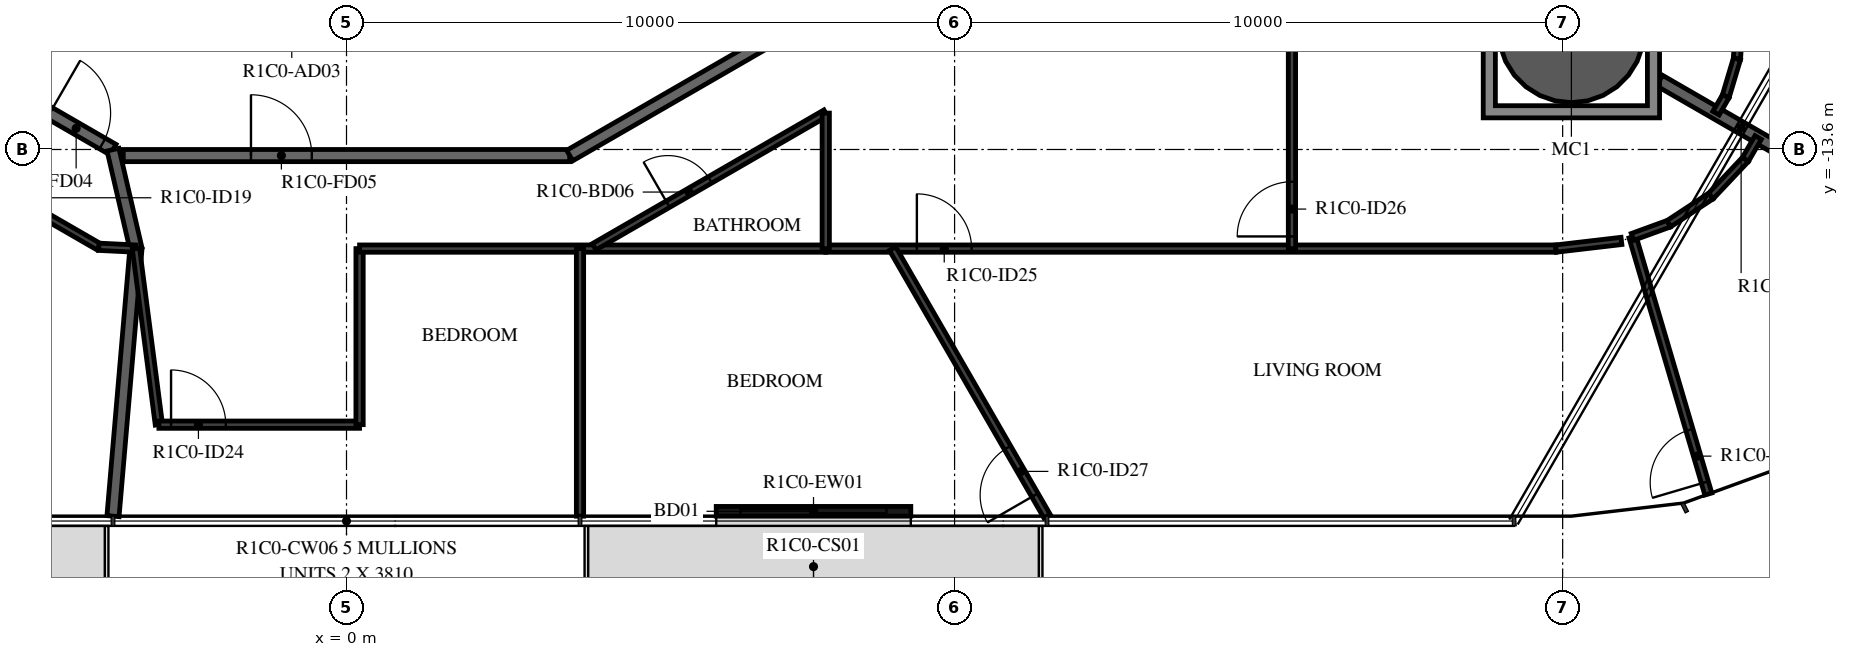
"""IFC4 building model, lengths in metres.
Left out: names, types, materials, properties, quantities, classifications, styles, units other than length and angle.
Written with IfcOpenShell. Run it as: python <this file> out.ifc"""

import sys

from ifc_helpers import new_model, si_unit, direction, frame, frame_2d, origin, origin_2d, place, context, subcontext, project, spatial, polyline, rectangle, hollow_circle, outline, extrude, element, fill, save


model = new_model("IFC4")
c1 = context("Model", 3, precision=1e-05, world=origin(), true_north=direction((0.0, 1.0)))
c2 = subcontext(c1, "Body", "Model", "MODEL_VIEW")
j1 = project(units=[si_unit("LENGTHUNIT", "METRE"), si_unit("PLANEANGLEUNIT", "RADIAN")], contexts=[c1])
p1 = place(None, origin())
s1 = spatial("IfcSite", under=j1, at=p1, CompositionType="ELEMENT")
p2 = place(p1, origin())
s2 = spatial("IfcBuilding", under=s1, at=p2, CompositionType="ELEMENT")
p3 = place(p2, frame((0.0, 0.0, 66.4)))
s3 = spatial("IfcBuildingStorey", under=s2, at=p3, CompositionType="ELEMENT", Elevation=66.4)
p4 = place(p3, frame((20.144, -11.63, -0.38), z_axis=(0.0, 0.0, 1.0), x_axis=(1.0, 0.0, 0.0)))
e1 = element("IfcColumn", 1, at=p4, inside=s3, PredefinedType="COLUMN", context=c2, shape_type="SweptSolid", body=[
    extrude(hollow_circle(Radius=1.2, WallThickness=0.06, at=origin_2d()), origin(), (0.0, 0.0, 1.0), 2.616),
])
p5 = place(p3, frame((6.08, -19.55, 0.0), z_axis=(0.0, 0.0, 1.0), x_axis=(1.0, 0.0, 0.0)))
e2 = element("IfcWall", 2, at=p5, inside=s3, PredefinedType="STANDARD", context=c2, shape_type="SweptSolid", body=[
    extrude(rectangle(XDim=3.2, YDim=0.16, at=frame_2d((1.6, 0.0))), origin(), (0.0, 0.0, 1.0), 3.05),
])
p6 = place(p5, frame((0.4, 0.0, 0.0)))
e3 = element("IfcOpeningElement", 3, at=p6, cuts=e2, PredefinedType="OPENING", context=c2, shape_type="SweptSolid", body=[
    extrude(rectangle(XDim=2.4, YDim=2.4, at=frame_2d((1.2, 1.2))), frame((0.0, 0.09, 0.0), z_axis=(0.0, -1.0, 0.0), x_axis=(1.0, 0.0, 0.0)), (0.0, 0.0, 1.0), 0.18),
])
p7 = place(p3, frame((-10.029, -10.029, 0.0), z_axis=(0.0, 0.0, 1.0), x_axis=(0.866022878987, -0.500004373052, 0.0)))
e4 = element("IfcWall", 4, at=p7, inside=s3, PredefinedType="STANDARD", context=c2, shape_type="SweptSolid", body=[
    extrude(rectangle(XDim=7.146, YDim=0.2, at=frame_2d((3.573, 0.0))), origin(), (0.0, 0.0, 1.0), 3.05),
])
p8 = place(p7, frame((5.947, 0.0, 0.0)))
e5 = element("IfcOpeningElement", 5, at=p8, cuts=e4, PredefinedType="OPENING", context=c2, shape_type="SweptSolid", body=[
    extrude(rectangle(XDim=1.0, YDim=2.1, at=frame_2d((0.5, 1.05))), frame((0.0, 0.11, 0.0), z_axis=(0.0, -1.0, 0.0), x_axis=(1.0, 0.0, 0.0)), (0.0, 0.0, 1.0), 0.22),
])
p9 = place(p3, frame((-3.671, -13.7, 0.0), z_axis=(0.0, 0.0, 1.0), x_axis=(1.0, 0.0, 0.0)))
e6 = element("IfcWall", 6, at=p9, inside=s3, PredefinedType="STANDARD", context=c2, shape_type="SweptSolid", body=[
    extrude(rectangle(XDim=7.342, YDim=0.2, at=frame_2d((3.671, 0.0))), origin(), (0.0, 0.0, 1.0), 3.05),
])
p10 = place(p9, frame((2.1, 0.0, 0.0)))
e7 = element("IfcOpeningElement", 7, at=p10, cuts=e6, PredefinedType="OPENING", context=c2, shape_type="SweptSolid", body=[
    extrude(rectangle(XDim=1.0, YDim=2.1, at=frame_2d((0.5, 1.05))), frame((0.0, 0.11, 0.0), z_axis=(0.0, -1.0, 0.0), x_axis=(1.0, 0.0, 0.0)), (0.0, 0.0, 1.0), 0.22),
])
p11 = place(p3, frame((3.671, -13.7, 0.0), z_axis=(0.0, 0.0, 1.0), x_axis=(0.866024439905, 0.500001669485, 0.0)))
e8 = element("IfcWall", 8, at=p11, inside=s3, PredefinedType="STANDARD", context=c2, shape_type="SweptSolid", body=[
    extrude(rectangle(XDim=7.342, YDim=0.2, at=frame_2d((3.671, 0.0))), origin(), (0.0, 0.0, 1.0), 3.05),
])
p12 = place(p3, frame((-3.463, -15.23, 0.0), z_axis=(0.0, 0.0, 1.0), x_axis=(-0.225894501138, 0.974151771725, 0.0)))
e9 = element("IfcWall", 9, at=p12, inside=s3, PredefinedType="STANDARD", context=c2, shape_type="SweptSolid", body=[
    extrude(rectangle(XDim=1.671, YDim=0.2, at=frame_2d((0.835, 0.0))), origin(), (0.0, 0.0, 1.0), 3.05),
])
p13 = place(p3, frame((-3.84, -19.63, 0.0), z_axis=(0.0, 0.0, 1.0), x_axis=(0.085470135005, 0.996340732893, 0.0)))
e10 = element("IfcWall", 10, at=p13, inside=s3, PredefinedType="STANDARD", context=c2, shape_type="SweptSolid", body=[
    extrude(rectangle(XDim=4.416, YDim=0.2, at=frame_2d((2.208, 0.0))), origin(), (0.0, 0.0, 1.0), 3.05),
])
p14 = place(p3, frame((27.025, -15.603, 0.0), z_axis=(0.0, 0.0, 1.0), x_axis=(-0.866030653443, 0.499990907215, 0.0)))
e11 = element("IfcWall", 11, at=p14, inside=s3, PredefinedType="STANDARD", context=c2, shape_type="SweptSolid", body=[
    extrude(rectangle(XDim=6.271, YDim=0.2, at=frame_2d((3.136, 0.0))), origin(), (0.0, 0.0, 1.0), 3.05),
])
p15 = place(p3, frame((-5.122, -14.594, 0.0), z_axis=(0.0, 0.0, 1.0), x_axis=(0.86610168388, -0.499867855718, 0.0)))
e12 = element("IfcWall", 12, at=p15, inside=s3, PredefinedType="PARTITIONING", context=c2, shape_type="SweptSolid", body=[
    extrude(rectangle(XDim=1.211, YDim=0.12, at=frame_2d((0.605, 0.0))), origin(), (0.0, 0.0, 1.0), 3.05),
])
p16 = place(p3, frame((-4.073, -15.2, 0.0), z_axis=(0.0, 0.0, 1.0), x_axis=(0.99879090756, -0.049160176723, 0.0)))
e13 = element("IfcWall", 13, at=p16, inside=s3, PredefinedType="PARTITIONING", context=c2, shape_type="SweptSolid", body=[
    extrude(rectangle(XDim=0.611, YDim=0.12, at=frame_2d((0.305, 0.0))), origin(), (0.0, 0.0, 1.0), 3.05),
])
p17 = place(p3, frame((-3.463, -15.23, 0.0), z_axis=(0.0, 0.0, 1.0), x_axis=(0.129260547059, -0.991610665016, 0.0)))
e14 = element("IfcWall", 14, at=p17, inside=s3, PredefinedType="PARTITIONING", context=c2, shape_type="SweptSolid", body=[
    extrude(rectangle(XDim=2.92, YDim=0.12, at=frame_2d((1.46, 0.0))), origin(), (0.0, 0.0, 1.0), 3.05),
])
p18 = place(p3, frame((-3.085, -18.125, 0.0), z_axis=(0.0, 0.0, 1.0), x_axis=(1.0, 0.0, 0.0)))
e15 = element("IfcWall", 15, at=p18, inside=s3, PredefinedType="PARTITIONING", context=c2, shape_type="SweptSolid", body=[
    extrude(rectangle(XDim=3.3, YDim=0.12, at=frame_2d((1.65, 0.0))), origin(), (0.0, 0.0, 1.0), 3.05),
])
p19 = place(p18, frame((0.2, 0.0, 0.0)))
e16 = element("IfcOpeningElement", 16, at=p19, cuts=e15, PredefinedType="OPENING", context=c2, shape_type="SweptSolid", body=[
    extrude(rectangle(XDim=0.9, YDim=2.1, at=frame_2d((0.45, 1.05))), frame((0.0, 0.07, 0.0), z_axis=(0.0, -1.0, 0.0), x_axis=(1.0, 0.0, 0.0)), (0.0, 0.0, 1.0), 0.14),
])
p20 = place(p3, frame((0.215, -18.125, 0.0), z_axis=(0.0, 0.0, 1.0), x_axis=(0.0, 1.0, 0.0)))
e17 = element("IfcWall", 17, at=p20, inside=s3, PredefinedType="PARTITIONING", context=c2, shape_type="SweptSolid", body=[
    extrude(rectangle(XDim=2.896, YDim=0.12, at=frame_2d((1.448, 0.0))), origin(), (0.0, 0.0, 1.0), 3.05),
])
p21 = place(p3, frame((0.215, -15.23, 0.0), z_axis=(0.0, 0.0, 1.0), x_axis=(1.0, 0.0, 0.0)))
e18 = element("IfcWall", 18, at=p21, inside=s3, PredefinedType="PARTITIONING", context=c2, shape_type="SweptSolid", body=[
    extrude(rectangle(XDim=7.667, YDim=0.12, at=frame_2d((3.833, 0.0))), origin(), (0.0, 0.0, 1.0), 3.05),
])
p22 = place(p3, frame((7.881, -15.23, 0.0), z_axis=(0.0, 0.0, 1.0), x_axis=(1.0, 0.0, 0.0)))
e19 = element("IfcWall", 19, at=p22, inside=s3, PredefinedType="PARTITIONING", context=c2, shape_type="SweptSolid", body=[
    extrude(rectangle(XDim=12.006, YDim=0.12, at=frame_2d((6.003, 0.0))), origin(), (0.0, 0.0, 1.0), 3.05),
])
p23 = place(p22, frame((1.499, 0.0, 0.0)))
e20 = element("IfcOpeningElement", 20, at=p23, cuts=e19, PredefinedType="OPENING", context=c2, shape_type="SweptSolid", body=[
    extrude(rectangle(XDim=0.9, YDim=2.1, at=frame_2d((0.45, 1.05))), frame((0.0, 0.07, 0.0), z_axis=(0.0, -1.0, 0.0), x_axis=(1.0, 0.0, 0.0)), (0.0, 0.0, 1.0), 0.14),
])
p24 = place(p3, frame((4.073, -15.2, 0.0), z_axis=(0.0, 0.0, 1.0), x_axis=(0.866041369968, 0.499972344739, 0.0)))
e21 = element("IfcWall", 21, at=p24, inside=s3, PredefinedType="PARTITIONING", context=c2, shape_type="SweptSolid", body=[
    extrude(rectangle(XDim=4.398, YDim=0.12, at=frame_2d((2.199, 0.0))), origin(), (0.0, 0.0, 1.0), 3.05),
])
p25 = place(p24, frame((1.4, 0.0, 0.0)))
e22 = element("IfcOpeningElement", 22, at=p25, cuts=e21, PredefinedType="OPENING", context=c2, shape_type="SweptSolid", body=[
    extrude(rectangle(XDim=0.8, YDim=2.1, at=frame_2d((0.4, 1.05))), frame((0.0, 0.07, 0.0), z_axis=(0.0, -1.0, 0.0), x_axis=(1.0, 0.0, 0.0)), (0.0, 0.0, 1.0), 0.14),
])
p26 = place(p3, frame((7.881, -13.001, 0.0), z_axis=(0.0, 0.0, 1.0), x_axis=(0.0, -1.0, 0.0)))
e23 = element("IfcWall", 23, at=p26, inside=s3, PredefinedType="PARTITIONING", context=c2, shape_type="SweptSolid", body=[
    extrude(rectangle(XDim=2.229, YDim=0.12, at=frame_2d((1.114, 0.0))), origin(), (0.0, 0.0, 1.0), 3.05),
])
p27 = place(p3, frame((15.548, -15.23, 0.0), z_axis=(0.0, 0.0, 1.0), x_axis=(0.0, 1.0, 0.0)))
e24 = element("IfcWall", 24, at=p27, inside=s3, PredefinedType="PARTITIONING", context=c2, shape_type="SweptSolid", body=[
    extrude(rectangle(XDim=6.253, YDim=0.12, at=frame_2d((3.127, 0.0))), origin(), (0.0, 0.0, 1.0), 3.05),
])
p28 = place(p27, frame((0.2, 0.0, 0.0)))
e25 = element("IfcOpeningElement", 25, at=p28, cuts=e24, PredefinedType="OPENING", context=c2, shape_type="SweptSolid", body=[
    extrude(rectangle(XDim=0.9, YDim=2.1, at=frame_2d((0.45, 1.05))), frame((0.0, 0.07, 0.0), z_axis=(0.0, -1.0, 0.0), x_axis=(1.0, 0.0, 0.0)), (0.0, 0.0, 1.0), 0.14),
])
p29 = place(p3, frame((3.84, -19.63, 0.0), z_axis=(0.0, 0.0, 1.0), x_axis=(0.0, 1.0, 0.0)))
e26 = element("IfcWall", 26, at=p29, inside=s3, PredefinedType="PARTITIONING", context=c2, shape_type="SweptSolid", body=[
    extrude(rectangle(XDim=4.4, YDim=0.12, at=frame_2d((2.2, 0.0))), origin(), (0.0, 0.0, 1.0), 3.05),
])
p30 = place(p3, frame((11.52, -19.63, 0.0), z_axis=(0.0, 0.0, 1.0), x_axis=(-0.499999763888, 0.866025540104, 0.0)))
e27 = element("IfcWall", 27, at=p30, inside=s3, PredefinedType="PARTITIONING", context=c2, shape_type="SweptSolid", body=[
    extrude(rectangle(XDim=5.081, YDim=0.12, at=frame_2d((2.54, 0.0))), origin(), (0.0, 0.0, 1.0), 3.05),
])
p31 = place(p30, frame((0.4, 0.0, 0.0)))
e28 = element("IfcOpeningElement", 28, at=p31, cuts=e27, PredefinedType="OPENING", context=c2, shape_type="SweptSolid", body=[
    extrude(rectangle(XDim=0.9, YDim=2.1, at=frame_2d((0.45, 1.05))), frame((0.0, 0.07, 0.0), z_axis=(0.0, -1.0, 0.0), x_axis=(1.0, 0.0, 0.0)), (0.0, 0.0, 1.0), 0.14),
])
p32 = place(p3, frame((20.967, -15.104, 0.0), z_axis=(0.0, 0.0, 1.0), x_axis=(-0.993231641151, -0.116150363826, 0.0)))
e29 = element("IfcWall", 29, at=p32, inside=s3, PredefinedType="PARTITIONING", context=c2, shape_type="SweptSolid", body=[
    extrude(rectangle(XDim=1.087, YDim=0.12, at=frame_2d((0.543, 0.0))), origin(), (0.0, 0.0, 1.0), 3.05),
])
p33 = place(p3, frame((22.396, -19.266, 0.0), z_axis=(0.0, 0.0, 1.0), x_axis=(-0.282873823334, 0.959157130022, 0.0)))
e30 = element("IfcWall", 30, at=p33, inside=s3, PredefinedType="PARTITIONING", context=c2, shape_type="SweptSolid", body=[
    extrude(rectangle(XDim=4.409, YDim=0.12, at=frame_2d((2.204, 0.0))), origin(), (0.0, 0.0, 1.0), 3.05),
])
p34 = place(p33, frame((0.2, 0.0, 0.0)))
e31 = element("IfcOpeningElement", 31, at=p34, cuts=e30, PredefinedType="OPENING", context=c2, shape_type="SweptSolid", body=[
    extrude(rectangle(XDim=0.9, YDim=2.1, at=frame_2d((0.45, 1.05))), frame((0.0, 0.07, 0.0), z_axis=(0.0, -1.0, 0.0), x_axis=(1.0, 0.0, 0.0)), (0.0, 0.0, 1.0), 0.14),
])
p35 = place(p3, frame((21.149, -15.038, 0.0), z_axis=(0.0, 0.0, 1.0), x_axis=(0.939726102094, 0.341928140173, 0.0)))
e32 = element("IfcWall", 32, at=p35, inside=s3, PredefinedType="PARTITIONING", context=c2, shape_type="SweptSolid", body=[
    extrude(rectangle(XDim=0.635, YDim=0.12, at=frame_2d((0.318, 0.0))), origin(), (0.0, 0.0, 1.0), 3.05),
])
p36 = place(p3, frame((21.746, -14.82, 0.0), z_axis=(0.0, 0.0, 1.0), x_axis=(0.835477570013, 0.549524549046, 0.0)))
e33 = element("IfcWall", 33, at=p36, inside=s3, PredefinedType="PARTITIONING", context=c2, shape_type="SweptSolid", body=[
    extrude(rectangle(XDim=0.829, YDim=0.12, at=frame_2d((0.415, 0.0))), origin(), (0.0, 0.0, 1.0), 3.05),
])
p37 = place(p3, frame((22.438, -14.365, 0.0), z_axis=(0.0, 0.0, 1.0), x_axis=(0.686182189596, 0.727429723535, 0.0)))
e34 = element("IfcWall", 34, at=p37, inside=s3, PredefinedType="PARTITIONING", context=c2, shape_type="SweptSolid", body=[
    extrude(rectangle(XDim=0.829, YDim=0.12, at=frame_2d((0.414, 0.0))), origin(), (0.0, 0.0, 1.0), 3.05),
])
p38 = place(p3, frame((23.007, -13.762, 0.0), z_axis=(0.0, 0.0, 1.0), x_axis=(0.499875358948, 0.866097353371, 0.0)))
e35 = element("IfcWall", 35, at=p38, inside=s3, PredefinedType="PARTITIONING", context=c2, shape_type="SweptSolid", body=[
    extrude(rectangle(XDim=0.415, YDim=0.12, at=frame_2d((0.207, 0.0))), origin(), (0.0, 0.0, 1.0), 3.05),
])
p39 = place(p3, frame((22.904, -11.469, 0.0), z_axis=(0.0, 0.0, 1.0), x_axis=(-0.05820906079, -0.998304415117, 0.0)))
e36 = element("IfcWall", 36, at=p39, inside=s3, PredefinedType="PARTITIONING", context=c2, shape_type="SweptSolid", body=[
    extrude(rectangle(XDim=0.642, YDim=0.12, at=frame_2d((0.321, 0.0))), origin(), (0.0, 0.0, 1.0), 3.05),
])
p40 = place(p3, frame((22.866, -12.11, 0.0), z_axis=(0.0, 0.0, 1.0), x_axis=(-0.286754684479, -0.958004045362, 0.0)))
e37 = element("IfcWall", 37, at=p40, inside=s3, PredefinedType="PARTITIONING", context=c2, shape_type="SweptSolid", body=[
    extrude(rectangle(XDim=0.642, YDim=0.12, at=frame_2d((0.321, 0.0))), origin(), (0.0, 0.0, 1.0), 3.05),
])
p41 = place(p3, frame((22.682, -12.725, 0.0), z_axis=(0.0, 0.0, 1.0), x_axis=(-0.500226934229, -0.865894343596, 0.0)))
e38 = element("IfcWall", 38, at=p41, inside=s3, PredefinedType="PARTITIONING", context=c2, shape_type="SweptSolid", body=[
    extrude(rectangle(XDim=0.321, YDim=0.12, at=frame_2d((0.161, 0.0))), origin(), (0.0, 0.0, 1.0), 3.05),
])
p42 = place(p3, frame((28.037, -12.759, 0.0), z_axis=(0.0, 0.0, 1.0), x_axis=(-0.866009909538, 0.500026835863, 0.0)))
e39 = element("IfcWall", 39, at=p42, inside=s3, PredefinedType="PARTITIONING", context=c2, shape_type="SweptSolid", body=[
    extrude(rectangle(XDim=6.943, YDim=0.12, at=frame_2d((3.471, 0.0))), origin(), (0.0, 0.0, 1.0), 3.05),
])
p43 = place(p42, frame((0.4, 0.0, 0.0)))
e40 = element("IfcOpeningElement", 40, at=p43, cuts=e39, PredefinedType="OPENING", context=c2, shape_type="SweptSolid", body=[
    extrude(rectangle(XDim=0.9, YDim=2.1, at=frame_2d((0.45, 1.05))), frame((0.0, 0.07, 0.0), z_axis=(0.0, -1.0, 0.0), x_axis=(1.0, 0.0, 0.0)), (0.0, 0.0, 1.0), 0.14),
])
p44 = place(p3, origin())
e41 = element("IfcWall", 41, at=p44, inside=s3, PredefinedType="STANDARD", context=c2, shape_type="SweptSolid", body=[
    extrude(outline(polyline([(21.594, -10.18), (21.594, -13.08), (18.694, -13.08), (18.694, -10.18), (21.594, -10.18)]), holes=[polyline([(18.894, -12.88), (21.394, -12.88), (21.394, -10.38), (18.894, -10.38), (18.894, -12.88)])]), origin(), (0.0, 0.0, 1.0), 3.05),
])
p45 = place(p6, origin())
e42 = element("IfcDoor", 42, at=p45, inside=s3, OperationType="DOUBLE_DOOR_SLIDING", PredefinedType="DOOR", context=c2, shape_type="SweptSolid", body=[
    extrude(rectangle(XDim=2.4, YDim=2.4, at=frame_2d((1.2, 1.2))), frame((0.0, 0.025, 0.0), z_axis=(0.0, -1.0, 0.0), x_axis=(1.0, 0.0, 0.0)), (0.0, 0.0, 1.0), 0.05),
])
fill(e3, e42)
p46 = place(p8, origin())
e43 = element("IfcDoor", 43, at=p46, inside=s3, OperationType="SINGLE_SWING_LEFT", PredefinedType="DOOR", context=c2, shape_type="SweptSolid", body=[
    extrude(rectangle(XDim=1.0, YDim=2.1, at=frame_2d((0.5, 1.05))), frame((0.0, 0.025, 0.0), z_axis=(0.0, -1.0, 0.0), x_axis=(1.0, 0.0, 0.0)), (0.0, 0.0, 1.0), 0.05),
])
fill(e5, e43)
p47 = place(p10, origin())
e44 = element("IfcDoor", 44, at=p47, inside=s3, OperationType="SINGLE_SWING_LEFT", PredefinedType="DOOR", context=c2, shape_type="SweptSolid", body=[
    extrude(rectangle(XDim=1.0, YDim=2.1, at=frame_2d((0.5, 1.05))), frame((0.0, 0.025, 0.0), z_axis=(0.0, -1.0, 0.0), x_axis=(1.0, 0.0, 0.0)), (0.0, 0.0, 1.0), 0.05),
])
fill(e7, e44)
p48 = place(p19, origin())
e45 = element("IfcDoor", 45, at=p48, inside=s3, OperationType="SINGLE_SWING_LEFT", PredefinedType="DOOR", context=c2, shape_type="SweptSolid", body=[
    extrude(rectangle(XDim=0.9, YDim=2.1, at=frame_2d((0.45, 1.05))), frame((0.0, 0.025, 0.0), z_axis=(0.0, -1.0, 0.0), x_axis=(1.0, 0.0, 0.0)), (0.0, 0.0, 1.0), 0.05),
])
fill(e16, e45)
p49 = place(p25, origin())
e46 = element("IfcDoor", 46, at=p49, inside=s3, OperationType="SINGLE_SWING_RIGHT", PredefinedType="DOOR", context=c2, shape_type="SweptSolid", body=[
    extrude(rectangle(XDim=0.8, YDim=2.1, at=frame_2d((0.4, 1.05))), frame((0.0, 0.025, 0.0), z_axis=(0.0, -1.0, 0.0), x_axis=(1.0, 0.0, 0.0)), (0.0, 0.0, 1.0), 0.05),
])
fill(e22, e46)
p50 = place(p23, origin())
e47 = element("IfcDoor", 47, at=p50, inside=s3, OperationType="SINGLE_SWING_RIGHT", PredefinedType="DOOR", context=c2, shape_type="SweptSolid", body=[
    extrude(rectangle(XDim=0.9, YDim=2.1, at=frame_2d((0.45, 1.05))), frame((0.0, 0.025, 0.0), z_axis=(0.0, -1.0, 0.0), x_axis=(1.0, 0.0, 0.0)), (0.0, 0.0, 1.0), 0.05),
])
fill(e20, e47)
p51 = place(p28, origin())
e48 = element("IfcDoor", 48, at=p51, inside=s3, OperationType="SINGLE_SWING_RIGHT", PredefinedType="DOOR", context=c2, shape_type="SweptSolid", body=[
    extrude(rectangle(XDim=0.9, YDim=2.1, at=frame_2d((0.45, 1.05))), frame((0.0, 0.025, 0.0), z_axis=(0.0, -1.0, 0.0), x_axis=(1.0, 0.0, 0.0)), (0.0, 0.0, 1.0), 0.05),
])
fill(e25, e48)
p52 = place(p31, origin())
e49 = element("IfcDoor", 49, at=p52, inside=s3, OperationType="SINGLE_SWING_LEFT", PredefinedType="DOOR", context=c2, shape_type="SweptSolid", body=[
    extrude(rectangle(XDim=0.9, YDim=2.1, at=frame_2d((0.45, 1.05))), frame((0.0, 0.025, 0.0), z_axis=(0.0, -1.0, 0.0), x_axis=(1.0, 0.0, 0.0)), (0.0, 0.0, 1.0), 0.05),
])
fill(e28, e49)
p53 = place(p34, origin())
e50 = element("IfcDoor", 50, at=p53, inside=s3, OperationType="SINGLE_SWING_RIGHT", PredefinedType="DOOR", context=c2, shape_type="SweptSolid", body=[
    extrude(rectangle(XDim=0.9, YDim=2.1, at=frame_2d((0.45, 1.05))), frame((0.0, 0.025, 0.0), z_axis=(0.0, -1.0, 0.0), x_axis=(1.0, 0.0, 0.0)), (0.0, 0.0, 1.0), 0.05),
])
fill(e31, e50)
save(model, sys.argv[1])
